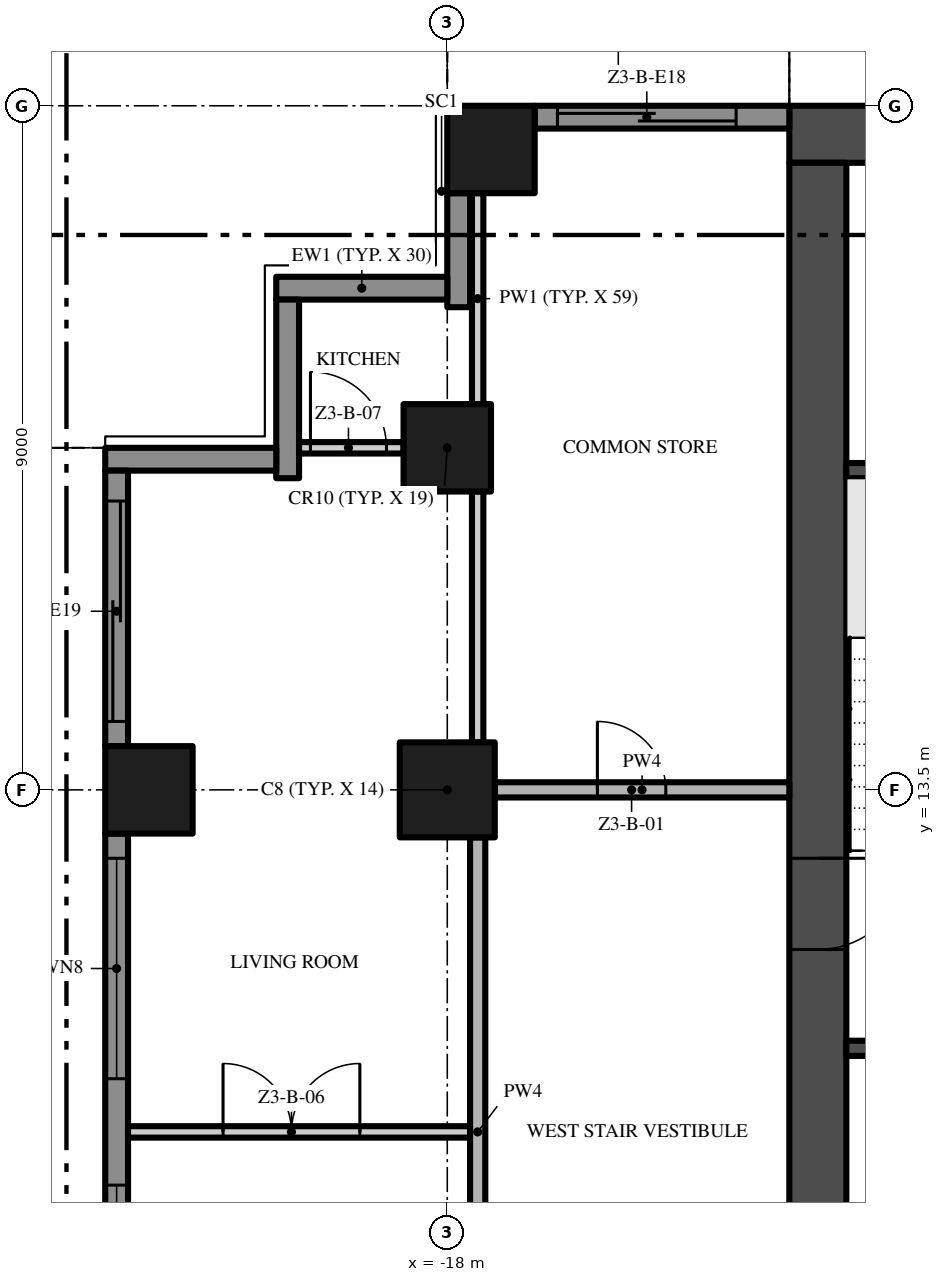
"""IFC4 building model, lengths in metres.
Left out: names, types, materials, properties, quantities, classifications, styles, units other than length and angle.
Written with IfcOpenShell. Run it as: python <this file> out.ifc"""

import sys

from ifc_helpers import new_model, si_unit, direction, frame, frame_2d, origin, origin_2d, place, context, subcontext, project, spatial, polyline, rectangle, outline, extrude, element, fill, save


model = new_model("IFC4")
c1 = context("Model", 3, precision=1e-05, world=origin(), true_north=direction((0.0, 1.0)))
c2 = subcontext(c1, "Body", "Model", "MODEL_VIEW")
j1 = project(units=[si_unit("LENGTHUNIT", "METRE"), si_unit("PLANEANGLEUNIT", "RADIAN")], contexts=[c1])
p1 = place(None, origin())
s1 = spatial("IfcSite", under=j1, at=p1, CompositionType="ELEMENT")
p2 = place(p1, origin())
s2 = spatial("IfcBuilding", under=s1, at=p2, CompositionType="ELEMENT")
p3 = place(p2, frame((0.0, 0.0, 144.0)))
s3 = spatial("IfcBuildingStorey", under=s2, at=p3, CompositionType="ELEMENT", Elevation=144.0)
p4 = place(p3, frame((13.5, 22.125, -0.3), z_axis=(0.0, 0.0, 1.0), x_axis=(-1.0, 0.0, 0.0)))
e1 = element("IfcWall", 1, at=p4, inside=s3, PredefinedType="SHEAR", context=c2, shape_type="SweptSolid", body=[
    extrude(rectangle(XDim=27.0, YDim=0.75, at=frame_2d((13.5, 0.0))), origin(), (0.0, 0.0, 1.0), 3.8),
])
p5 = place(p3, frame((-13.125, 21.75, -0.3), z_axis=(0.0, 0.0, 1.0), x_axis=(0.0, -1.0, 0.0)))
e2 = element("IfcWall", 2, at=p5, inside=s3, PredefinedType="SHEAR", context=c2, shape_type="SweptSolid", body=[
    extrude(rectangle(XDim=16.5, YDim=0.75, at=frame_2d((8.25, 0.0))), origin(), (0.0, 0.0, 1.0), 3.8),
])
p6 = place(p5, frame((9.15, 0.0, 0.3)))
e3 = element("IfcOpeningElement", 3, at=p6, cuts=e2, PredefinedType="OPENING", context=c2, shape_type="SweptSolid", body=[
    extrude(rectangle(XDim=1.2, YDim=2.2, at=frame_2d((0.6, 1.1))), frame((0.0, 0.385, 0.0), z_axis=(0.0, -1.0, 0.0), x_axis=(1.0, 0.0, 0.0)), (0.0, 0.0, 1.0), 0.77),
])
p7 = place(p3, frame((-18.0, 13.5, 0.0), z_axis=(0.0, 0.0, 1.0), x_axis=(1.0, 0.0, 0.0)))
e4 = element("IfcColumn", 4, at=p7, inside=s3, PredefinedType="COLUMN", context=c2, shape_type="SweptSolid", body=[
    extrude(rectangle(XDim=1.25, YDim=1.25, at=origin_2d()), origin(), (0.0, 0.0, 1.0), 3.5),
])
for number, where, z_axis, x_axis in (
    (5, (-17.425, 21.925, 0.0), (0.0, 0.0, 1.0), (1.0, 0.0, 0.0)),
    (6, (-21.925, 13.5, 0.0), (0.0, 0.0, 1.0), (1.0, 0.0, 0.0)),
    (7, (-18.0, 18.0, 0.0), (0.0, 0.0, 1.0), (1.0, 0.0, 0.0)),
):
    element("IfcColumn", number, at=place(p3, frame(where, z_axis=z_axis, x_axis=x_axis)), inside=s3, PredefinedType="COLUMN", context=c2, shape_type="SweptSolid", body=[
        extrude(rectangle(XDim=1.15, YDim=1.15, at=origin_2d()), origin(), (0.0, 0.0, 1.0), 3.5),
    ])
p8 = place(p3, frame((-16.85, 22.35, 0.0), z_axis=(0.0, 0.0, 1.0), x_axis=(1.0, 0.0, 0.0)))
e8 = element("IfcWall", 8, at=p8, inside=s3, PredefinedType="SOLIDWALL", context=c2, shape_type="SweptSolid", body=[
    extrude(rectangle(XDim=3.35, YDim=0.3, at=frame_2d((1.675, 0.0))), origin(), (0.0, 0.0, 1.0), 3.5),
])
p9 = place(p8, frame((0.3, 0.0, 0.0)))
e9 = element("IfcOpeningElement", 9, at=p9, cuts=e8, PredefinedType="OPENING", context=c2, shape_type="SweptSolid", body=[
    extrude(rectangle(XDim=2.35, YDim=2.4, at=frame_2d((1.175, 1.2))), frame((0.0, 0.16, 0.0), z_axis=(0.0, -1.0, 0.0), x_axis=(1.0, 0.0, 0.0)), (0.0, 0.0, 1.0), 0.32),
])
p10 = place(p3, frame((-17.85, 19.85, 0.0), z_axis=(0.0, 0.0, 1.0), x_axis=(0.0, 1.0, 0.0)))
e10 = element("IfcWall", 10, at=p10, inside=s3, PredefinedType="SOLIDWALL", context=c2, shape_type="SweptSolid", body=[
    extrude(rectangle(XDim=1.5, YDim=0.3, at=frame_2d((0.75, 0.0))), origin(), (0.0, 0.0, 1.0), 3.5),
])
p11 = place(p3, frame((-20.25, 20.1, 0.0), z_axis=(0.0, 0.0, 1.0), x_axis=(1.0, 0.0, 0.0)))
e11 = element("IfcWall", 11, at=p11, inside=s3, PredefinedType="SOLIDWALL", context=c2, shape_type="SweptSolid", body=[
    extrude(rectangle(XDim=2.25, YDim=0.3, at=frame_2d((1.125, 0.0))), origin(), (0.0, 0.0, 1.0), 3.5),
])
p12 = place(p3, frame((-20.1, 17.6, 0.0), z_axis=(0.0, 0.0, 1.0), x_axis=(0.0, 1.0, 0.0)))
e12 = element("IfcWall", 12, at=p12, inside=s3, PredefinedType="SOLIDWALL", context=c2, shape_type="SweptSolid", body=[
    extrude(rectangle(XDim=2.35, YDim=0.3, at=frame_2d((1.175, 0.0))), origin(), (0.0, 0.0, 1.0), 3.5),
])
p13 = place(p3, frame((-22.5, 17.85, 0.0), z_axis=(0.0, 0.0, 1.0), x_axis=(1.0, 0.0, 0.0)))
e13 = element("IfcWall", 13, at=p13, inside=s3, PredefinedType="SOLIDWALL", context=c2, shape_type="SweptSolid", body=[
    extrude(rectangle(XDim=2.25, YDim=0.3, at=frame_2d((1.125, 0.0))), origin(), (0.0, 0.0, 1.0), 3.5),
])
p14 = place(p3, frame((-22.35, 14.075, 0.0), z_axis=(0.0, 0.0, 1.0), x_axis=(0.0, 1.0, 0.0)))
e14 = element("IfcWall", 14, at=p14, inside=s3, PredefinedType="SOLIDWALL", context=c2, shape_type="SweptSolid", body=[
    extrude(rectangle(XDim=3.625, YDim=0.3, at=frame_2d((1.812, 0.0))), origin(), (0.0, 0.0, 1.0), 3.5),
])
p15 = place(p14, frame((0.325, 0.0, 0.0)))
e15 = element("IfcOpeningElement", 15, at=p15, cuts=e14, PredefinedType="OPENING", context=c2, shape_type="SweptSolid", body=[
    extrude(rectangle(XDim=2.9, YDim=2.4, at=frame_2d((1.45, 1.2))), frame((0.0, 0.16, 0.0), z_axis=(0.0, -1.0, 0.0), x_axis=(1.0, 0.0, 0.0)), (0.0, 0.0, 1.0), 0.32),
])
p16 = place(p3, frame((-22.35, 5.075, 0.0), z_axis=(0.0, 0.0, 1.0), x_axis=(0.0, 1.0, 0.0)))
e16 = element("IfcWall", 16, at=p16, inside=s3, PredefinedType="SOLIDWALL", context=c2, shape_type="SweptSolid", body=[
    extrude(rectangle(XDim=7.85, YDim=0.3, at=frame_2d((3.925, 0.0))), origin(), (0.0, 0.0, 1.0), 3.5),
])
p17 = place(p16, frame((4.625, 0.0, 0.45)))
e17 = element("IfcOpeningElement", 17, at=p17, cuts=e16, PredefinedType="OPENING", context=c2, shape_type="SweptSolid", body=[
    extrude(rectangle(XDim=2.9, YDim=2.65, at=frame_2d((1.45, 1.325))), frame((0.0, 0.16, 0.0), z_axis=(0.0, -1.0, 0.0), x_axis=(1.0, 0.0, 0.0)), (0.0, 0.0, 1.0), 0.32),
])
p18 = place(p16, frame((0.325, 0.0, 0.45)))
e18 = element("IfcOpeningElement", 18, at=p18, cuts=e16, PredefinedType="OPENING", context=c2, shape_type="SweptSolid", body=[
    extrude(rectangle(XDim=2.9, YDim=2.65, at=frame_2d((1.45, 1.325))), frame((0.0, 0.16, 0.0), z_axis=(0.0, -1.0, 0.0), x_axis=(1.0, 0.0, 0.0)), (0.0, 0.0, 1.0), 0.32),
])
p19 = place(p3, origin())
e19 = element("IfcWall", 19, at=p19, inside=s3, PredefinedType="USERDEFINED", context=c2, shape_type="SweptSolid", body=[
    extrude(outline(polyline([(-24.3, 18.0), (-25.005, 16.5), (-25.441, 15.0), (-25.5, 14.25), (-25.441, 13.5), (-25.005, 12.0), (-24.3, 10.5), (-23.595, 9.0), (-23.159, 7.5), (-23.1, 6.75), (-23.159, 6.0), (-23.595, 4.5), (-24.3, 3.0), (-25.005, 1.5), (-25.441, 0.0), (-25.5, -0.75), (-25.441, -1.5), (-25.005, -3.0), (-24.3, -4.5), (-23.595, -6.0), (-23.159, -7.5), (-23.1, -8.25), (-23.159, -9.0), (-23.595, -10.5), (-24.3, -12.0), (-25.005, -13.5), (-24.779, -13.606), (-24.074, -12.106), (-23.36, -10.589), (-22.911, -9.045), (-22.849, -8.25), (-22.911, -7.455), (-23.36, -5.911), (-24.074, -4.394), (-24.771, -2.911), (-25.194, -1.455), (-25.249, -0.75), (-25.194, -0.045), (-24.771, 1.411), (-24.074, 2.894), (-23.36, 4.411), (-22.911, 5.955), (-22.849, 6.75), (-22.911, 7.545), (-23.36, 9.089), (-24.074, 10.606), (-24.771, 12.089), (-25.194, 13.545), (-25.249, 14.25), (-25.194, 14.955), (-24.771, 16.411), (-24.074, 17.894), (-24.3, 18.0)])), origin(), (0.0, 0.0, 1.0), 0.9),
])
for number, where, z_axis, x_axis in (
    (20, (-12.75, 10.1, 0.0), (0.0, 0.0, 1.0), (1.0, 0.0, 0.0)),
    (21, (-12.75, 17.7, 0.0), (0.0, 0.0, 1.0), (1.0, 0.0, 0.0)),
):
    element("IfcWall", number, at=place(p3, frame(where, z_axis=z_axis, x_axis=x_axis)), inside=s3, PredefinedType="SHEAR", context=c2, shape_type="SweptSolid", body=[
        extrude(rectangle(XDim=3.1, YDim=0.2, at=frame_2d((1.55, 0.0))), origin(), (0.0, 0.0, 1.0), 3.5),
    ])
p20 = place(p3, frame((-22.2, 9.0, 0.0), z_axis=(0.0, 0.0, 1.0), x_axis=(1.0, 0.0, 0.0)))
e22 = element("IfcWall", 22, at=p20, inside=s3, PredefinedType="PARTITIONING", context=c2, shape_type="SweptSolid", body=[
    extrude(rectangle(XDim=4.5, YDim=0.15, at=frame_2d((2.25, 0.0))), origin(), (0.0, 0.0, 1.0), 3.5),
])
p21 = place(p20, frame((1.25, 0.0, 0.0)))
e23 = element("IfcOpeningElement", 23, at=p21, cuts=e22, PredefinedType="OPENING", context=c2, shape_type="SweptSolid", body=[
    extrude(rectangle(XDim=1.8, YDim=2.4, at=frame_2d((0.9, 1.2))), frame((0.0, 0.085, 0.0), z_axis=(0.0, -1.0, 0.0), x_axis=(1.0, 0.0, 0.0)), (0.0, 0.0, 1.0), 0.17),
])
p22 = place(p3, frame((-17.375, 13.5, 0.0), z_axis=(0.0, 0.0, 1.0), x_axis=(1.0, 0.0, 0.0)))
e24 = element("IfcWall", 24, at=p22, inside=s3, PredefinedType="PARTITIONING", context=c2, shape_type="SweptSolid", body=[
    extrude(rectangle(XDim=3.875, YDim=0.2, at=frame_2d((1.938, 0.0))), origin(), (0.0, 0.0, 1.0), 3.5),
])
p23 = place(p22, frame((1.35, 0.0, 0.0)))
e25 = element("IfcOpeningElement", 25, at=p23, cuts=e24, PredefinedType="OPENING", context=c2, shape_type="SweptSolid", body=[
    extrude(rectangle(XDim=0.9, YDim=2.1, at=frame_2d((0.45, 1.05))), frame((0.0, 0.11, 0.0), z_axis=(0.0, -1.0, 0.0), x_axis=(1.0, 0.0, 0.0)), (0.0, 0.0, 1.0), 0.22),
])
p24 = place(p3, frame((-19.95, 18.0, 0.0), z_axis=(0.0, 0.0, 1.0), x_axis=(1.0, 0.0, 0.0)))
e26 = element("IfcWall", 26, at=p24, inside=s3, PredefinedType="PARTITIONING", context=c2, shape_type="SweptSolid", body=[
    extrude(rectangle(XDim=1.375, YDim=0.15, at=frame_2d((0.688, 0.0))), origin(), (0.0, 0.0, 1.0), 3.5),
])
p25 = place(p24, frame((0.15, 0.0, 0.0)))
e27 = element("IfcOpeningElement", 27, at=p25, cuts=e26, PredefinedType="OPENING", context=c2, shape_type="SweptSolid", body=[
    extrude(rectangle(XDim=1.0, YDim=2.4, at=frame_2d((0.5, 1.2))), frame((0.0, 0.085, 0.0), z_axis=(0.0, -1.0, 0.0), x_axis=(1.0, 0.0, 0.0)), (0.0, 0.0, 1.0), 0.17),
])
p26 = place(p3, frame((-17.6, 5.125, 0.0), z_axis=(0.0, 0.0, 1.0), x_axis=(0.0, 1.0, 0.0)))
e28 = element("IfcWall", 28, at=p26, inside=s3, PredefinedType="PARTITIONING", context=c2, shape_type="SweptSolid", body=[
    extrude(rectangle(XDim=7.75, YDim=0.2, at=frame_2d((3.875, 0.0))), origin(), (0.0, 0.0, 1.0), 3.5),
])
p27 = place(p26, frame((1.0, 0.0, 0.0)))
e29 = element("IfcOpeningElement", 29, at=p27, cuts=e28, PredefinedType="OPENING", context=c2, shape_type="SweptSolid", body=[
    extrude(rectangle(XDim=1.2, YDim=2.4, at=frame_2d((0.6, 1.2))), frame((0.0, 0.11, 0.0), z_axis=(0.0, -1.0, 0.0), x_axis=(1.0, 0.0, 0.0)), (0.0, 0.0, 1.0), 0.22),
])
p28 = place(p3, frame((-17.6, 14.125, 0.0), z_axis=(0.0, 0.0, 1.0), x_axis=(0.0, 1.0, 0.0)))
e30 = element("IfcWall", 30, at=p28, inside=s3, PredefinedType="PARTITIONING", context=c2, shape_type="SweptSolid", body=[
    extrude(rectangle(XDim=3.3, YDim=0.15, at=frame_2d((1.65, 0.0))), origin(), (0.0, 0.0, 1.0), 3.5),
])
p29 = place(p3, frame((-17.6, 18.575, 0.0), z_axis=(0.0, 0.0, 1.0), x_axis=(0.0, 1.0, 0.0)))
e31 = element("IfcWall", 31, at=p29, inside=s3, PredefinedType="PARTITIONING", context=c2, shape_type="SweptSolid", body=[
    extrude(rectangle(XDim=2.775, YDim=0.15, at=frame_2d((1.387, 0.0))), origin(), (0.0, 0.0, 1.0), 3.5),
])
p30 = place(p9, origin())
e32 = element("IfcDoor", 32, at=p30, inside=s3, OperationType="SINGLE_SWING_LEFT", PredefinedType="DOOR", context=c2, shape_type="SweptSolid", body=[
    extrude(rectangle(XDim=2.35, YDim=2.4, at=frame_2d((1.175, 1.2))), frame((0.0, 0.025, 0.0), z_axis=(0.0, -1.0, 0.0), x_axis=(1.0, 0.0, 0.0)), (0.0, 0.0, 1.0), 0.05),
])
fill(e9, e32)
p31 = place(p15, origin())
e33 = element("IfcDoor", 33, at=p31, inside=s3, OperationType="SINGLE_SWING_LEFT", PredefinedType="DOOR", context=c2, shape_type="SweptSolid", body=[
    extrude(rectangle(XDim=2.9, YDim=2.4, at=frame_2d((1.45, 1.2))), frame((0.0, 0.025, 0.0), z_axis=(0.0, -1.0, 0.0), x_axis=(1.0, 0.0, 0.0)), (0.0, 0.0, 1.0), 0.05),
])
fill(e15, e33)
p32 = place(p17, origin())
e34 = element("IfcWindow", 34, at=p32, inside=s3, PartitioningType="SINGLE_PANEL", PredefinedType="WINDOW", context=c2, shape_type="SweptSolid", body=[
    extrude(rectangle(XDim=2.9, YDim=2.65, at=frame_2d((1.45, 1.325))), frame((0.0, 0.03, 0.0), z_axis=(0.0, -1.0, 0.0), x_axis=(1.0, 0.0, 0.0)), (0.0, 0.0, 1.0), 0.06),
])
fill(e17, e34)
p33 = place(p18, origin())
e35 = element("IfcWindow", 35, at=p33, inside=s3, PartitioningType="SINGLE_PANEL", PredefinedType="WINDOW", context=c2, shape_type="SweptSolid", body=[
    extrude(rectangle(XDim=2.9, YDim=2.65, at=frame_2d((1.45, 1.325))), frame((0.0, 0.03, 0.0), z_axis=(0.0, -1.0, 0.0), x_axis=(1.0, 0.0, 0.0)), (0.0, 0.0, 1.0), 0.06),
])
fill(e18, e35)
p34 = place(p6, frame((1.2, 0.0, 0.0), z_axis=(0.0, 0.0, 1.0), x_axis=(-1.0, 0.0, 0.0)))
e36 = element("IfcDoor", 36, at=p34, inside=s3, OperationType="SINGLE_SWING_RIGHT", PredefinedType="DOOR", context=c2, shape_type="SweptSolid", body=[
    extrude(rectangle(XDim=1.2, YDim=2.2, at=frame_2d((0.6, 1.1))), frame((0.0, 0.025, 0.0), z_axis=(0.0, -1.0, 0.0), x_axis=(1.0, 0.0, 0.0)), (0.0, 0.0, 1.0), 0.05),
])
fill(e3, e36)
p35 = place(p23, origin())
e37 = element("IfcDoor", 37, at=p35, inside=s3, OperationType="SINGLE_SWING_LEFT", PredefinedType="DOOR", context=c2, shape_type="SweptSolid", body=[
    extrude(rectangle(XDim=0.9, YDim=2.1, at=frame_2d((0.45, 1.05))), frame((0.0, 0.025, 0.0), z_axis=(0.0, -1.0, 0.0), x_axis=(1.0, 0.0, 0.0)), (0.0, 0.0, 1.0), 0.05),
])
fill(e25, e37)
p36 = place(p21, origin())
e38 = element("IfcDoor", 38, at=p36, inside=s3, OperationType="DOUBLE_DOOR_SINGLE_SWING", PredefinedType="DOOR", context=c2, shape_type="SweptSolid", body=[
    extrude(rectangle(XDim=1.8, YDim=2.4, at=frame_2d((0.9, 1.2))), frame((0.0, 0.025, 0.0), z_axis=(0.0, -1.0, 0.0), x_axis=(1.0, 0.0, 0.0)), (0.0, 0.0, 1.0), 0.05),
])
fill(e23, e38)
p37 = place(p25, origin())
e39 = element("IfcDoor", 39, at=p37, inside=s3, OperationType="SINGLE_SWING_LEFT", PredefinedType="DOOR", context=c2, shape_type="SweptSolid", body=[
    extrude(rectangle(XDim=1.0, YDim=2.4, at=frame_2d((0.5, 1.2))), frame((0.0, 0.025, 0.0), z_axis=(0.0, -1.0, 0.0), x_axis=(1.0, 0.0, 0.0)), (0.0, 0.0, 1.0), 0.05),
])
fill(e27, e39)
save(model, sys.argv[1])
